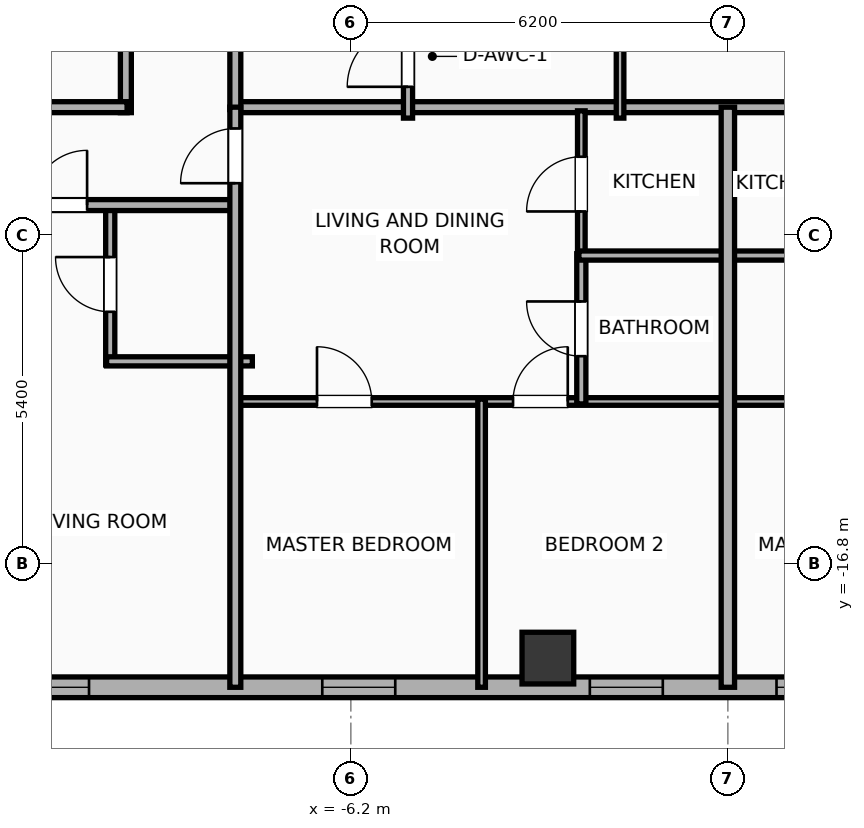
"""IFC4 building model, lengths in metres.
Left out: names, types, materials, properties, quantities, classifications, styles, units other than length and angle.
Written with IfcOpenShell. Run it as: python <this file> out.ifc"""

import sys

from ifc_helpers import new_model, si_unit, direction, frame, frame_2d, origin, origin_2d, place, context, subcontext, project, spatial, rectangle, hollow_rectangle, extrude, element, fill, save


model = new_model("IFC4")
c1 = context("Model", 3, precision=1e-05, world=origin(), true_north=direction((0.0, 1.0)))
c2 = subcontext(c1, "Body", "Model", "MODEL_VIEW")
j1 = project(units=[si_unit("LENGTHUNIT", "METRE"), si_unit("PLANEANGLEUNIT", "RADIAN")], contexts=[c1])
p1 = place(None, origin())
s1 = spatial("IfcSite", under=j1, at=p1, CompositionType="ELEMENT")
p2 = place(p1, origin())
s2 = spatial("IfcBuilding", under=s1, at=p2, CompositionType="ELEMENT")
p3 = place(p2, frame((0.0, 0.0, 243.1)))
s3 = spatial("IfcBuildingStorey", under=s2, at=p3, CompositionType="ELEMENT", Elevation=243.1)
p4 = place(p3, frame((-2.96, -18.35, 0.0), z_axis=(0.0, 0.0, 1.0), x_axis=(1.0, 0.0, 0.0)))
e1 = element("IfcColumn", 1, at=p4, inside=s3, PredefinedType="COLUMN", context=c2, shape_type="SweptSolid", body=[
    extrude(hollow_rectangle(XDim=0.85, YDim=0.85, WallThickness=0.028, at=origin_2d()), origin(), (0.0, 0.0, 1.0), 3.9),
])
p5 = place(p3, frame((26.783, -18.83, 0.0), z_axis=(0.0, 0.0, 1.0), x_axis=(-1.0, 0.0, 0.0)))
e2 = element("IfcWall", 2, at=p5, inside=s3, PredefinedType="ELEMENTEDWALL", context=c2, shape_type="SweptSolid", body=[
    extrude(rectangle(XDim=49.566, YDim=0.34, at=frame_2d((24.783, 0.0))), origin(), (0.0, 0.0, 1.0), 3.65),
])
p6 = place(p5, frame((23.583, 0.0, 0.75)))
e3 = element("IfcOpeningElement", 3, at=p6, cuts=e2, PredefinedType="OPENING", context=c2, shape_type="SweptSolid", body=[
    extrude(rectangle(XDim=2.4, YDim=2.1, at=frame_2d((1.2, 1.05))), frame((0.0, 0.18, 0.0), z_axis=(0.0, -1.0, 0.0), x_axis=(1.0, 0.0, 0.0)), (0.0, 0.0, 1.0), 0.36),
])
p7 = place(p5, frame((41.756, 0.0, 0.75)))
e4 = element("IfcOpeningElement", 4, at=p7, cuts=e2, PredefinedType="OPENING", context=c2, shape_type="SweptSolid", body=[
    extrude(rectangle(XDim=2.4, YDim=2.1, at=frame_2d((1.2, 1.05))), frame((0.0, 0.18, 0.0), z_axis=(0.0, -1.0, 0.0), x_axis=(1.0, 0.0, 0.0)), (0.0, 0.0, 1.0), 0.36),
])
p8 = place(p5, frame((47.222, 0.0, 0.75)))
e5 = element("IfcOpeningElement", 5, at=p8, cuts=e2, PredefinedType="OPENING", context=c2, shape_type="SweptSolid", body=[
    extrude(rectangle(XDim=1.2, YDim=2.05, at=frame_2d((0.6, 1.025))), frame((0.0, 0.18, 0.0), z_axis=(0.0, -1.0, 0.0), x_axis=(1.0, 0.0, 0.0)), (0.0, 0.0, 1.0), 0.36),
])
p9 = place(p5, frame((45.263, 0.0, 0.75)))
e6 = element("IfcOpeningElement", 6, at=p9, cuts=e2, PredefinedType="OPENING", context=c2, shape_type="SweptSolid", body=[
    extrude(rectangle(XDim=1.2, YDim=2.05, at=frame_2d((0.6, 1.025))), frame((0.0, 0.18, 0.0), z_axis=(0.0, -1.0, 0.0), x_axis=(1.0, 0.0, 0.0)), (0.0, 0.0, 1.0), 0.36),
])
p10 = place(p5, frame((37.289, 0.0, 0.75)))
e7 = element("IfcOpeningElement", 7, at=p10, cuts=e2, PredefinedType="OPENING", context=c2, shape_type="SweptSolid", body=[
    extrude(rectangle(XDim=1.2, YDim=2.05, at=frame_2d((0.6, 1.025))), frame((0.0, 0.18, 0.0), z_axis=(0.0, -1.0, 0.0), x_axis=(1.0, 0.0, 0.0)), (0.0, 0.0, 1.0), 0.36),
])
p11 = place(p5, frame((16.115, 0.0, 0.75)))
e8 = element("IfcOpeningElement", 8, at=p11, cuts=e2, PredefinedType="OPENING", context=c2, shape_type="SweptSolid", body=[
    extrude(rectangle(XDim=1.2, YDim=2.05, at=frame_2d((0.6, 1.025))), frame((0.0, 0.18, 0.0), z_axis=(0.0, -1.0, 0.0), x_axis=(1.0, 0.0, 0.0)), (0.0, 0.0, 1.0), 0.36),
])
p12 = place(p5, frame((12.422, 0.0, 0.75)))
e9 = element("IfcOpeningElement", 9, at=p12, cuts=e2, PredefinedType="OPENING", context=c2, shape_type="SweptSolid", body=[
    extrude(rectangle(XDim=1.2, YDim=2.05, at=frame_2d((0.6, 1.025))), frame((0.0, 0.18, 0.0), z_axis=(0.0, -1.0, 0.0), x_axis=(1.0, 0.0, 0.0)), (0.0, 0.0, 1.0), 0.36),
])
p13 = place(p5, frame((8.01, 0.0, 0.75)))
e10 = element("IfcOpeningElement", 10, at=p13, cuts=e2, PredefinedType="OPENING", context=c2, shape_type="SweptSolid", body=[
    extrude(rectangle(XDim=1.2, YDim=2.05, at=frame_2d((0.6, 1.025))), frame((0.0, 0.18, 0.0), z_axis=(0.0, -1.0, 0.0), x_axis=(1.0, 0.0, 0.0)), (0.0, 0.0, 1.0), 0.36),
])
p14 = place(p5, frame((5.037, 0.0, 0.75)))
e11 = element("IfcOpeningElement", 11, at=p14, cuts=e2, PredefinedType="OPENING", context=c2, shape_type="SweptSolid", body=[
    extrude(rectangle(XDim=1.2, YDim=2.05, at=frame_2d((0.6, 1.025))), frame((0.0, 0.18, 0.0), z_axis=(0.0, -1.0, 0.0), x_axis=(1.0, 0.0, 0.0)), (0.0, 0.0, 1.0), 0.36),
])
p15 = place(p5, frame((1.811, 0.0, 0.75)))
e12 = element("IfcOpeningElement", 12, at=p15, cuts=e2, PredefinedType="OPENING", context=c2, shape_type="SweptSolid", body=[
    extrude(rectangle(XDim=1.2, YDim=2.05, at=frame_2d((0.6, 1.025))), frame((0.0, 0.18, 0.0), z_axis=(0.0, -1.0, 0.0), x_axis=(1.0, 0.0, 0.0)), (0.0, 0.0, 1.0), 0.36),
])
p16 = place(p5, frame((32.253, 0.0, 0.75)))
e13 = element("IfcOpeningElement", 13, at=p16, cuts=e2, PredefinedType="OPENING", context=c2, shape_type="SweptSolid", body=[
    extrude(rectangle(XDim=1.2, YDim=2.05, at=frame_2d((0.6, 1.025))), frame((0.0, 0.18, 0.0), z_axis=(0.0, -1.0, 0.0), x_axis=(1.0, 0.0, 0.0)), (0.0, 0.0, 1.0), 0.36),
])
p17 = place(p5, frame((27.853, 0.0, 0.75)))
e14 = element("IfcOpeningElement", 14, at=p17, cuts=e2, PredefinedType="OPENING", context=c2, shape_type="SweptSolid", body=[
    extrude(rectangle(XDim=1.2, YDim=2.05, at=frame_2d((0.6, 1.025))), frame((0.0, 0.18, 0.0), z_axis=(0.0, -1.0, 0.0), x_axis=(1.0, 0.0, 0.0)), (0.0, 0.0, 1.0), 0.36),
])
p18 = place(p5, frame((20.473, 0.0, 0.75)))
e15 = element("IfcOpeningElement", 15, at=p18, cuts=e2, PredefinedType="OPENING", context=c2, shape_type="SweptSolid", body=[
    extrude(rectangle(XDim=1.2, YDim=2.05, at=frame_2d((0.6, 1.025))), frame((0.0, 0.18, 0.0), z_axis=(0.0, -1.0, 0.0), x_axis=(1.0, 0.0, 0.0)), (0.0, 0.0, 1.0), 0.36),
])
p19 = place(p3, frame((-9.9, -9.38, 0.0), z_axis=(0.0, 0.0, 1.0), x_axis=(0.0, 1.0, 0.0)))
e16 = element("IfcWall", 16, at=p19, inside=s3, PredefinedType="PARTITIONING", context=c2, shape_type="SweptSolid", body=[
    extrude(rectangle(XDim=18.76, YDim=0.18, at=frame_2d((9.38, 0.0))), origin(), (0.0, 0.0, 1.0), 3.65),
])
p20 = place(p19, frame((7.892, 0.0, 0.0)))
e17 = element("IfcOpeningElement", 17, at=p20, cuts=e16, PredefinedType="OPENING", context=c2, shape_type="SweptSolid", body=[
    extrude(rectangle(XDim=1.1, YDim=2.05, at=frame_2d((0.55, 1.025))), frame((0.0, 0.1, 0.0), z_axis=(0.0, -1.0, 0.0), x_axis=(1.0, 0.0, 0.0)), (0.0, 0.0, 1.0), 0.2),
])
p21 = place(p3, frame((-26.23, -9.29, 0.0), z_axis=(0.0, 0.0, 1.0), x_axis=(1.0, 0.0, 0.0)))
e18 = element("IfcWall", 18, at=p21, inside=s3, PredefinedType="PARTITIONING", context=c2, shape_type="SweptSolid", body=[
    extrude(rectangle(XDim=16.35, YDim=0.18, at=frame_2d((8.175, 0.0))), origin(), (0.0, 0.0, 1.0), 3.65),
])
p22 = place(p3, frame((-8.15, -9.29, 0.0), z_axis=(0.0, 0.0, 1.0), x_axis=(1.0, 0.0, 0.0)))
e19 = element("IfcWall", 19, at=p22, inside=s3, PredefinedType="PARTITIONING", context=c2, shape_type="SweptSolid", body=[
    extrude(rectangle(XDim=16.3, YDim=0.18, at=frame_2d((8.15, 0.0))), origin(), (0.0, 0.0, 1.0), 3.65),
])
p23 = place(p3, frame((-8.1, -9.33, 0.0), z_axis=(0.0, 0.0, 1.0), x_axis=(0.0, 1.0, 0.0)))
e20 = element("IfcWall", 20, at=p23, inside=s3, PredefinedType="PARTITIONING", context=c2, shape_type="SweptSolid", body=[
    extrude(rectangle(XDim=18.66, YDim=0.18, at=frame_2d((9.33, 0.0))), origin(), (0.0, 0.0, 1.0), 3.65),
])
p24 = place(p23, frame((1.366, 0.0, 0.0)))
e21 = element("IfcOpeningElement", 21, at=p24, cuts=e20, PredefinedType="OPENING", context=c2, shape_type="SweptSolid", body=[
    extrude(rectangle(XDim=1.0, YDim=2.05, at=frame_2d((0.5, 1.025))), frame((0.0, 0.1, 0.0), z_axis=(0.0, -1.0, 0.0), x_axis=(1.0, 0.0, 0.0)), (0.0, 0.0, 1.0), 0.2),
])
p25 = place(p23, frame((10.721, 0.0, 0.0)))
e22 = element("IfcOpeningElement", 22, at=p25, cuts=e20, PredefinedType="OPENING", context=c2, shape_type="SweptSolid", body=[
    extrude(rectangle(XDim=0.95, YDim=2.05, at=frame_2d((0.475, 1.025))), frame((0.0, 0.1, 0.0), z_axis=(0.0, -1.0, 0.0), x_axis=(1.0, 0.0, 0.0)), (0.0, 0.0, 1.0), 0.2),
])
p26 = place(p3, frame((-5.26, -9.47, 0.0), z_axis=(0.0, 0.0, 1.0), x_axis=(0.0, 1.0, 0.0)))
e23 = element("IfcWall", 23, at=p26, inside=s3, PredefinedType="PLUMBINGWALL", context=c2, shape_type="SweptSolid", body=[
    extrude(rectangle(XDim=3.35, YDim=0.15, at=frame_2d((1.675, 0.0))), origin(), (0.0, 0.0, 1.0), 3.65),
])
p27 = place(p26, frame((0.515, 0.0, 0.0)))
e24 = element("IfcOpeningElement", 24, at=p27, cuts=e23, PredefinedType="OPENING", context=c2, shape_type="SweptSolid", body=[
    extrude(rectangle(XDim=1.0, YDim=2.05, at=frame_2d((0.5, 1.025))), frame((0.0, 0.085, 0.0), z_axis=(0.0, -1.0, 0.0), x_axis=(1.0, 0.0, 0.0)), (0.0, 0.0, 1.0), 0.17),
])
p28 = place(p3, frame((-1.773, -9.47, 0.0), z_axis=(0.0, 0.0, 1.0), x_axis=(0.0, 1.0, 0.0)))
e25 = element("IfcWall", 25, at=p28, inside=s3, PredefinedType="PARTITIONING", context=c2, shape_type="SweptSolid", body=[
    extrude(rectangle(XDim=18.89, YDim=0.125, at=frame_2d((9.445, 0.0))), origin(), (0.0, 0.0, 1.0), 3.65),
])
p29 = place(p28, frame((8.97, 0.0, 0.0)))
e26 = element("IfcOpeningElement", 26, at=p29, cuts=e25, PredefinedType="OPENING", context=c2, shape_type="SweptSolid", body=[
    extrude(rectangle(XDim=0.95, YDim=2.05, at=frame_2d((0.475, 1.025))), frame((0.0, 0.073, 0.0), z_axis=(0.0, -1.0, 0.0), x_axis=(1.0, 0.0, 0.0)), (0.0, 0.0, 1.0), 0.145),
])
p30 = place(p3, frame((-10.157, -13.53, 0.0), z_axis=(0.0, 0.0, 1.0), x_axis=(0.0, 1.0, 0.0)))
e27 = element("IfcWall", 27, at=p30, inside=s3, PredefinedType="PLUMBINGWALL", context=c2, shape_type="SweptSolid", body=[
    extrude(rectangle(XDim=2.65, YDim=0.15, at=frame_2d((1.325, 0.0))), origin(), (0.0, 0.0, 1.0), 3.65),
])
p31 = place(p30, frame((0.875, 0.0, 0.0)))
e28 = element("IfcOpeningElement", 28, at=p31, cuts=e27, PredefinedType="OPENING", context=c2, shape_type="SweptSolid", body=[
    extrude(rectangle(XDim=0.9, YDim=2.05, at=frame_2d((0.45, 1.025))), frame((0.0, 0.085, 0.0), z_axis=(0.0, -1.0, 0.0), x_axis=(1.0, 0.0, 0.0)), (0.0, 0.0, 1.0), 0.17),
])
p32 = place(p3, frame((-10.217, -13.47, 0.0), z_axis=(0.0, 0.0, 1.0), x_axis=(1.0, 0.0, 0.0)))
e29 = element("IfcWall", 29, at=p32, inside=s3, PredefinedType="PLUMBINGWALL", context=c2, shape_type="SweptSolid", body=[
    extrude(rectangle(XDim=2.397, YDim=0.15, at=frame_2d((1.198, 0.0))), origin(), (0.0, 0.0, 1.0), 3.65),
])
p33 = place(p3, frame((-26.23, -10.9, 0.0), z_axis=(0.0, 0.0, 1.0), x_axis=(1.0, 0.0, 0.0)))
e30 = element("IfcWall", 30, at=p33, inside=s3, PredefinedType="PARTITIONING", context=c2, shape_type="SweptSolid", body=[
    extrude(rectangle(XDim=18.15, YDim=0.18, at=frame_2d((9.075, 0.0))), origin(), (0.0, 0.0, 1.0), 3.65),
])
p34 = place(p33, frame((2.659, 0.0, 0.0)))
e31 = element("IfcOpeningElement", 31, at=p34, cuts=e30, PredefinedType="OPENING", context=c2, shape_type="SweptSolid", body=[
    extrude(rectangle(XDim=0.9, YDim=2.05, at=frame_2d((0.45, 1.025))), frame((0.0, 0.1, 0.0), z_axis=(0.0, -1.0, 0.0), x_axis=(1.0, 0.0, 0.0)), (0.0, 0.0, 1.0), 0.2),
])
p35 = place(p33, frame((9.571, 0.0, 0.0)))
e32 = element("IfcOpeningElement", 32, at=p35, cuts=e30, PredefinedType="OPENING", context=c2, shape_type="SweptSolid", body=[
    extrude(rectangle(XDim=1.15, YDim=2.05, at=frame_2d((0.575, 1.025))), frame((0.0, 0.1, 0.0), z_axis=(0.0, -1.0, 0.0), x_axis=(1.0, 0.0, 0.0)), (0.0, 0.0, 1.0), 0.2),
])
p36 = place(p33, frame((14.792, 0.0, 0.0)))
e33 = element("IfcOpeningElement", 33, at=p36, cuts=e30, PredefinedType="OPENING", context=c2, shape_type="SweptSolid", body=[
    extrude(rectangle(XDim=0.9, YDim=2.05, at=frame_2d((0.45, 1.025))), frame((0.0, 0.1, 0.0), z_axis=(0.0, -1.0, 0.0), x_axis=(1.0, 0.0, 0.0)), (0.0, 0.0, 1.0), 0.2),
])
p37 = place(p3, frame((-8.08, -14.13, 0.0), z_axis=(0.0, 0.0, 1.0), x_axis=(1.0, 0.0, 0.0)))
e34 = element("IfcWall", 34, at=p37, inside=s3, PredefinedType="PARTITIONING", context=c2, shape_type="SweptSolid", body=[
    extrude(rectangle(XDim=8.06, YDim=0.125, at=frame_2d((4.03, 0.0))), origin(), (0.0, 0.0, 1.0), 3.65),
])
p38 = place(p37, frame((1.323, 0.0, 0.0)))
e35 = element("IfcOpeningElement", 35, at=p38, cuts=e34, PredefinedType="OPENING", context=c2, shape_type="SweptSolid", body=[
    extrude(rectangle(XDim=0.9, YDim=2.05, at=frame_2d((0.45, 1.025))), frame((0.0, 0.073, 0.0), z_axis=(0.0, -1.0, 0.0), x_axis=(1.0, 0.0, 0.0)), (0.0, 0.0, 1.0), 0.145),
])
p39 = place(p37, frame((4.547, 0.0, 0.0)))
e36 = element("IfcOpeningElement", 36, at=p39, cuts=e34, PredefinedType="OPENING", context=c2, shape_type="SweptSolid", body=[
    extrude(rectangle(XDim=0.9, YDim=2.05, at=frame_2d((0.45, 1.025))), frame((0.0, 0.073, 0.0), z_axis=(0.0, -1.0, 0.0), x_axis=(1.0, 0.0, 0.0)), (0.0, 0.0, 1.0), 0.145),
])
p40 = place(p3, frame((-2.41, -11.76, 0.0), z_axis=(0.0, 0.0, 1.0), x_axis=(0.0, 1.0, 0.0)))
e37 = element("IfcWall", 37, at=p40, inside=s3, PredefinedType="PARTITIONING", context=c2, shape_type="SweptSolid", body=[
    extrude(rectangle(XDim=2.41, YDim=0.125, at=frame_2d((1.205, 0.0))), origin(), (0.0, 0.0, 1.0), 3.65),
])
p41 = place(p40, frame((0.755, 0.0, 0.0)))
e38 = element("IfcOpeningElement", 38, at=p41, cuts=e37, PredefinedType="OPENING", context=c2, shape_type="SweptSolid", body=[
    extrude(rectangle(XDim=0.9, YDim=2.05, at=frame_2d((0.45, 1.025))), frame((0.0, 0.073, 0.0), z_axis=(0.0, -1.0, 0.0), x_axis=(1.0, 0.0, 0.0)), (0.0, 0.0, 1.0), 0.145),
])
p42 = place(p3, frame((-2.41, -14.17, 0.0), z_axis=(0.0, 0.0, 1.0), x_axis=(0.0, 1.0, 0.0)))
e39 = element("IfcWall", 39, at=p42, inside=s3, PredefinedType="PLUMBINGWALL", context=c2, shape_type="SweptSolid", body=[
    extrude(rectangle(XDim=2.47, YDim=0.15, at=frame_2d((1.235, 0.0))), origin(), (0.0, 0.0, 1.0), 3.65),
])
p43 = place(p42, frame((0.785, 0.0, 0.0)))
e40 = element("IfcOpeningElement", 40, at=p43, cuts=e39, PredefinedType="OPENING", context=c2, shape_type="SweptSolid", body=[
    extrude(rectangle(XDim=0.9, YDim=2.05, at=frame_2d((0.45, 1.025))), frame((0.0, 0.085, 0.0), z_axis=(0.0, -1.0, 0.0), x_axis=(1.0, 0.0, 0.0)), (0.0, 0.0, 1.0), 0.17),
])
p44 = place(p3, frame((-2.45, -11.73, 0.0), z_axis=(0.0, 0.0, 1.0), x_axis=(1.0, 0.0, 0.0)))
e41 = element("IfcWall", 41, at=p44, inside=s3, PredefinedType="PLUMBINGWALL", context=c2, shape_type="SweptSolid", body=[
    extrude(rectangle(XDim=2.43, YDim=0.15, at=frame_2d((1.215, 0.0))), origin(), (0.0, 0.0, 1.0), 3.65),
])
p45 = place(p3, frame((-4.05, -18.83, 0.0), z_axis=(0.0, 0.0, 1.0), x_axis=(0.0, 1.0, 0.0)))
e42 = element("IfcWall", 42, at=p45, inside=s3, PredefinedType="PARTITIONING", context=c2, shape_type="SweptSolid", body=[
    extrude(rectangle(XDim=4.74, YDim=0.125, at=frame_2d((2.37, 0.0))), origin(), (0.0, 0.0, 1.0), 3.65),
])
p46 = place(p3, frame((-8.1, -18.83, 0.0), z_axis=(0.0, 0.0, 1.0), x_axis=(0.0, 1.0, 0.0)))
e43 = element("IfcWall", 43, at=p46, inside=s3, PredefinedType="PARTITIONING", context=c2, shape_type="SweptSolid", body=[
    extrude(rectangle(XDim=9.54, YDim=0.18, at=frame_2d((4.77, 0.0))), origin(), (0.0, 0.0, 1.0), 3.65),
])
p47 = place(p46, frame((8.29, 0.0, 0.0)))
e44 = element("IfcOpeningElement", 44, at=p47, cuts=e43, PredefinedType="OPENING", context=c2, shape_type="SweptSolid", body=[
    extrude(rectangle(XDim=0.9, YDim=2.05, at=frame_2d((0.45, 1.025))), frame((0.0, 0.1, 0.0), z_axis=(0.0, -1.0, 0.0), x_axis=(1.0, 0.0, 0.0)), (0.0, 0.0, 1.0), 0.2),
])
p48 = place(p3, frame((0.02, -14.13, 0.0), z_axis=(0.0, 0.0, 1.0), x_axis=(1.0, 0.0, 0.0)))
e45 = element("IfcWall", 45, at=p48, inside=s3, PredefinedType="PARTITIONING", context=c2, shape_type="SweptSolid", body=[
    extrude(rectangle(XDim=8.06, YDim=0.125, at=frame_2d((4.03, 0.0))), origin(), (0.0, 0.0, 1.0), 3.65),
])
p49 = place(p48, frame((1.323, 0.0, 0.0)))
e46 = element("IfcOpeningElement", 46, at=p49, cuts=e45, PredefinedType="OPENING", context=c2, shape_type="SweptSolid", body=[
    extrude(rectangle(XDim=0.9, YDim=2.05, at=frame_2d((0.45, 1.025))), frame((0.0, 0.073, 0.0), z_axis=(0.0, -1.0, 0.0), x_axis=(1.0, 0.0, 0.0)), (0.0, 0.0, 1.0), 0.145),
])
p50 = place(p48, frame((5.837, 0.0, 0.0)))
e47 = element("IfcOpeningElement", 47, at=p50, cuts=e45, PredefinedType="OPENING", context=c2, shape_type="SweptSolid", body=[
    extrude(rectangle(XDim=0.9, YDim=2.05, at=frame_2d((0.45, 1.025))), frame((0.0, 0.073, 0.0), z_axis=(0.0, -1.0, 0.0), x_axis=(1.0, 0.0, 0.0)), (0.0, 0.0, 1.0), 0.145),
])
p51 = place(p3, frame((0.02, -11.73, 0.0), z_axis=(0.0, 0.0, 1.0), x_axis=(1.0, 0.0, 0.0)))
e48 = element("IfcWall", 48, at=p51, inside=s3, PredefinedType="PLUMBINGWALL", context=c2, shape_type="SweptSolid", body=[
    extrude(rectangle(XDim=2.43, YDim=0.15, at=frame_2d((1.215, 0.0))), origin(), (0.0, 0.0, 1.0), 3.65),
])
p52 = place(p3, frame((0.0, -18.83, 0.0), z_axis=(0.0, 0.0, 1.0), x_axis=(0.0, 1.0, 0.0)))
e49 = element("IfcWall", 49, at=p52, inside=s3, PredefinedType="PARTITIONING", context=c2, shape_type="SweptSolid", body=[
    extrude(rectangle(XDim=9.54, YDim=0.22, at=frame_2d((4.77, 0.0))), origin(), (0.0, 0.0, 1.0), 3.65),
])
p53 = place(p6, origin())
e50 = element("IfcWindow", 50, at=p53, inside=s3, PartitioningType="SINGLE_PANEL", PredefinedType="WINDOW", context=c2, shape_type="SweptSolid", body=[
    extrude(rectangle(XDim=2.4, YDim=2.1, at=frame_2d((1.2, 1.05))), frame((0.0, 0.03, 0.0), z_axis=(0.0, -1.0, 0.0), x_axis=(1.0, 0.0, 0.0)), (0.0, 0.0, 1.0), 0.06),
])
fill(e3, e50)
p54 = place(p10, origin())
e51 = element("IfcWindow", 51, at=p54, inside=s3, PartitioningType="SINGLE_PANEL", PredefinedType="WINDOW", context=c2, shape_type="SweptSolid", body=[
    extrude(rectangle(XDim=1.2, YDim=2.05, at=frame_2d((0.6, 1.025))), frame((0.0, 0.03, 0.0), z_axis=(0.0, -1.0, 0.0), x_axis=(1.0, 0.0, 0.0)), (0.0, 0.0, 1.0), 0.06),
])
fill(e7, e51)
p55 = place(p16, origin())
e52 = element("IfcWindow", 52, at=p55, inside=s3, PartitioningType="SINGLE_PANEL", PredefinedType="WINDOW", context=c2, shape_type="SweptSolid", body=[
    extrude(rectangle(XDim=1.2, YDim=2.05, at=frame_2d((0.6, 1.025))), frame((0.0, 0.03, 0.0), z_axis=(0.0, -1.0, 0.0), x_axis=(1.0, 0.0, 0.0)), (0.0, 0.0, 1.0), 0.06),
])
fill(e13, e52)
p56 = place(p17, origin())
e53 = element("IfcWindow", 53, at=p56, inside=s3, PartitioningType="SINGLE_PANEL", PredefinedType="WINDOW", context=c2, shape_type="SweptSolid", body=[
    extrude(rectangle(XDim=1.2, YDim=2.05, at=frame_2d((0.6, 1.025))), frame((0.0, 0.03, 0.0), z_axis=(0.0, -1.0, 0.0), x_axis=(1.0, 0.0, 0.0)), (0.0, 0.0, 1.0), 0.06),
])
fill(e14, e53)
p57 = place(p27, origin())
e54 = element("IfcDoor", 54, at=p57, inside=s3, OperationType="SINGLE_SWING_LEFT", PredefinedType="DOOR", context=c2, shape_type="SweptSolid", body=[
    extrude(rectangle(XDim=1.0, YDim=2.05, at=frame_2d((0.5, 1.025))), frame((0.0, 0.025, 0.0), z_axis=(0.0, -1.0, 0.0), x_axis=(1.0, 0.0, 0.0)), (0.0, 0.0, 1.0), 0.05),
])
fill(e24, e54)
p58 = place(p31, origin())
e55 = element("IfcDoor", 55, at=p58, inside=s3, OperationType="SINGLE_SWING_RIGHT", PredefinedType="DOOR", context=c2, shape_type="SweptSolid", body=[
    extrude(rectangle(XDim=0.9, YDim=2.05, at=frame_2d((0.45, 1.025))), frame((0.0, 0.025, 0.0), z_axis=(0.0, -1.0, 0.0), x_axis=(1.0, 0.0, 0.0)), (0.0, 0.0, 1.0), 0.05),
])
fill(e28, e55)
p59 = place(p36, origin())
e56 = element("IfcDoor", 56, at=p59, inside=s3, OperationType="SINGLE_SWING_RIGHT", PredefinedType="DOOR", context=c2, shape_type="SweptSolid", body=[
    extrude(rectangle(XDim=0.9, YDim=2.05, at=frame_2d((0.45, 1.025))), frame((0.0, 0.025, 0.0), z_axis=(0.0, -1.0, 0.0), x_axis=(1.0, 0.0, 0.0)), (0.0, 0.0, 1.0), 0.05),
])
fill(e33, e56)
p60 = place(p38, origin())
e57 = element("IfcDoor", 57, at=p60, inside=s3, OperationType="SINGLE_SWING_LEFT", PredefinedType="DOOR", context=c2, shape_type="SweptSolid", body=[
    extrude(rectangle(XDim=0.9, YDim=2.05, at=frame_2d((0.45, 1.025))), frame((0.0, 0.025, 0.0), z_axis=(0.0, -1.0, 0.0), x_axis=(1.0, 0.0, 0.0)), (0.0, 0.0, 1.0), 0.05),
])
fill(e35, e57)
p61 = place(p39, origin())
e58 = element("IfcDoor", 58, at=p61, inside=s3, OperationType="SINGLE_SWING_RIGHT", PredefinedType="DOOR", context=c2, shape_type="SweptSolid", body=[
    extrude(rectangle(XDim=0.9, YDim=2.05, at=frame_2d((0.45, 1.025))), frame((0.0, 0.025, 0.0), z_axis=(0.0, -1.0, 0.0), x_axis=(1.0, 0.0, 0.0)), (0.0, 0.0, 1.0), 0.05),
])
fill(e36, e58)
p62 = place(p41, origin())
e59 = element("IfcDoor", 59, at=p62, inside=s3, OperationType="SINGLE_SWING_LEFT", PredefinedType="DOOR", context=c2, shape_type="SweptSolid", body=[
    extrude(rectangle(XDim=0.9, YDim=2.05, at=frame_2d((0.45, 1.025))), frame((0.0, 0.025, 0.0), z_axis=(0.0, -1.0, 0.0), x_axis=(1.0, 0.0, 0.0)), (0.0, 0.0, 1.0), 0.05),
])
fill(e38, e59)
p63 = place(p43, origin())
e60 = element("IfcDoor", 60, at=p63, inside=s3, OperationType="SINGLE_SWING_RIGHT", PredefinedType="DOOR", context=c2, shape_type="SweptSolid", body=[
    extrude(rectangle(XDim=0.9, YDim=2.05, at=frame_2d((0.45, 1.025))), frame((0.0, 0.025, 0.0), z_axis=(0.0, -1.0, 0.0), x_axis=(1.0, 0.0, 0.0)), (0.0, 0.0, 1.0), 0.05),
])
fill(e40, e60)
p64 = place(p47, origin())
e61 = element("IfcDoor", 61, at=p64, inside=s3, OperationType="SINGLE_SWING_LEFT", PredefinedType="DOOR", context=c2, shape_type="SweptSolid", body=[
    extrude(rectangle(XDim=0.9, YDim=2.05, at=frame_2d((0.45, 1.025))), frame((0.0, 0.025, 0.0), z_axis=(0.0, -1.0, 0.0), x_axis=(1.0, 0.0, 0.0)), (0.0, 0.0, 1.0), 0.05),
])
fill(e44, e61)
save(model, sys.argv[1])
